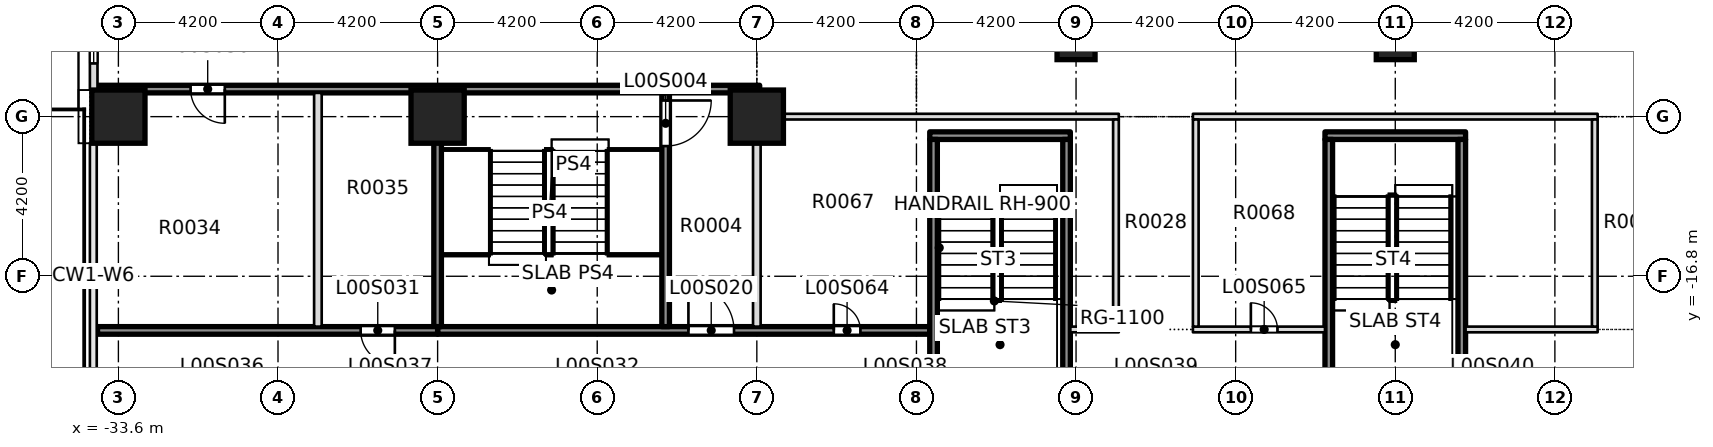
"""IFC4 building model, lengths in metres.
Left out: names, types, materials, properties, quantities, classifications, styles, units other than length and angle.
Written with IfcOpenShell. Run it as: python <this file> out.ifc"""

import sys

from ifc_helpers import new_model, si_unit, direction, frame, frame_2d, origin, origin_2d, place, context, subcontext, project, spatial, rectangle, extrude, element, fill, save


model = new_model("IFC4")
c1 = context("Model", 3, precision=1e-05, world=origin(), true_north=direction((0.0, 1.0)))
c2 = subcontext(c1, "Body", "Model", "MODEL_VIEW")
j1 = project(units=[si_unit("LENGTHUNIT", "METRE"), si_unit("PLANEANGLEUNIT", "RADIAN")], contexts=[c1])
p1 = place(None, origin())
s1 = spatial("IfcSite", under=j1, at=p1, CompositionType="ELEMENT")
p2 = place(p1, origin())
s2 = spatial("IfcBuilding", under=s1, at=p2, CompositionType="ELEMENT")
p3 = place(p2, origin())
s3 = spatial("IfcBuildingStorey", under=s2, at=p3, CompositionType="ELEMENT", Elevation=0.0)
for number, where, z_axis, x_axis in (
    (1, (-25.2, -12.6, -0.45), (0.0, 0.0, 1.0), (1.0, 0.0, 0.0)),
    (2, (-16.8, -12.6, -0.45), (0.0, 0.0, 1.0), (1.0, 0.0, 0.0)),
):
    element("IfcColumn", number, at=place(p3, frame(where, z_axis=z_axis, x_axis=x_axis)), inside=s3, PredefinedType="COLUMN", context=c2, shape_type="SweptSolid", body=[
        extrude(rectangle(XDim=1.4, YDim=1.4, at=origin_2d()), origin(), (0.0, 0.0, 1.0), 7.55),
    ])
for number, where, z_axis, x_axis in (
    (3, (-8.4, -10.6, -0.45), (0.0, 0.0, 1.0), (1.0, 0.0, 0.0)),
    (4, (0.0, -10.6, -0.45), (0.0, 0.0, 1.0), (1.0, 0.0, 0.0)),
):
    element("IfcColumn", number, at=place(p3, frame(where, z_axis=z_axis, x_axis=x_axis)), inside=s3, PredefinedType="COLUMN", context=c2, shape_type="SweptSolid", body=[
        extrude(rectangle(XDim=1.0, YDim=1.0, at=origin_2d()), origin(), (0.0, 0.0, 1.0), 7.55),
    ])
p4 = place(p3, frame((-33.6, -12.6, 0.0), z_axis=(0.0, 0.0, 1.0), x_axis=(1.0, 0.0, 0.0)))
e5 = element("IfcColumn", 5, at=p4, inside=s3, PredefinedType="COLUMN", context=c2, shape_type="SweptSolid", body=[
    extrude(rectangle(XDim=1.4, YDim=1.4, at=origin_2d()), origin(), (0.0, 0.0, 1.0), 7.5),
])
p5 = place(p3, frame((-25.2, -18.225, 0.0), z_axis=(0.0, 0.0, 1.0), x_axis=(1.0, 0.0, 0.0)))
e6 = element("IfcWall", 6, at=p5, inside=s3, PredefinedType="SOLIDWALL", context=c2, shape_type="SweptSolid", body=[
    extrude(rectangle(XDim=12.95, YDim=0.2, at=frame_2d((6.475, 0.0))), origin(), (0.0, 0.0, 1.0), 7.1),
])
p6 = place(p5, frame((6.6, 0.0, 0.0)))
e7 = element("IfcOpeningElement", 7, at=p6, cuts=e6, PredefinedType="OPENING", context=c2, shape_type="SweptSolid", body=[
    extrude(rectangle(XDim=1.2, YDim=2.1, at=frame_2d((0.6, 1.05))), frame((0.0, 0.11, 0.0), z_axis=(0.0, -1.0, 0.0), x_axis=(1.0, 0.0, 0.0)), (0.0, 0.0, 1.0), 0.22),
])
p7 = place(p5, frame((10.425, 0.0, 0.0)))
e8 = element("IfcOpeningElement", 8, at=p7, cuts=e6, PredefinedType="OPENING", context=c2, shape_type="SweptSolid", body=[
    extrude(rectangle(XDim=0.7, YDim=2.1, at=frame_2d((0.35, 1.05))), frame((0.0, 0.11, 0.0), z_axis=(0.0, -1.0, 0.0), x_axis=(1.0, 0.0, 0.0)), (0.0, 0.0, 1.0), 0.22),
])
p8 = place(p3, frame((-8.55, -18.2, 0.0), z_axis=(0.0, 0.0, 1.0), x_axis=(1.0, 0.0, 0.0)))
e9 = element("IfcWall", 9, at=p8, inside=s3, PredefinedType="PARTITIONING", context=c2, shape_type="SweptSolid", body=[
    extrude(rectangle(XDim=1.275, YDim=0.15, at=frame_2d((0.638, 0.0))), origin(), (0.0, 0.0, 1.0), 7.1),
])
p9 = place(p3, frame((-5.325, -18.2, 0.0), z_axis=(0.0, 0.0, 1.0), x_axis=(1.0, 0.0, 0.0)))
e10 = element("IfcWall", 10, at=p9, inside=s3, PredefinedType="PARTITIONING", context=c2, shape_type="SweptSolid", body=[
    extrude(rectangle(XDim=3.475, YDim=0.15, at=frame_2d((1.737, 0.0))), origin(), (0.0, 0.0, 1.0), 7.1),
])
p10 = place(p9, frame((1.525, 0.0, 0.0)))
e11 = element("IfcOpeningElement", 11, at=p10, cuts=e10, PredefinedType="OPENING", context=c2, shape_type="SweptSolid", body=[
    extrude(rectangle(XDim=0.7, YDim=2.1, at=frame_2d((0.35, 1.05))), frame((0.0, 0.085, 0.0), z_axis=(0.0, -1.0, 0.0), x_axis=(1.0, 0.0, 0.0)), (0.0, 0.0, 1.0), 0.17),
])
p11 = place(p3, frame((1.85, -18.2, 0.0), z_axis=(0.0, 0.0, 1.0), x_axis=(1.0, 0.0, 0.0)))
e12 = element("IfcWall", 12, at=p11, inside=s3, PredefinedType="PARTITIONING", context=c2, shape_type="SweptSolid", body=[
    extrude(rectangle(XDim=3.475, YDim=0.15, at=frame_2d((1.737, 0.0))), origin(), (0.0, 0.0, 1.0), 7.1),
])
p12 = place(p3, frame((-16.9, -12.6, 0.0), z_axis=(0.0, 0.0, 1.0), x_axis=(1.0, 0.0, 0.0)))
e13 = element("IfcWall", 13, at=p12, inside=s3, PredefinedType="PARTITIONING", context=c2, shape_type="SweptSolid", body=[
    extrude(rectangle(XDim=9.625, YDim=0.15, at=frame_2d((4.812, 0.0))), origin(), (0.0, 0.0, 1.0), 7.1),
])
p13 = place(p3, frame((-5.325, -12.6, 0.0), z_axis=(0.0, 0.0, 1.0), x_axis=(1.0, 0.0, 0.0)))
e14 = element("IfcWall", 14, at=p13, inside=s3, PredefinedType="PARTITIONING", context=c2, shape_type="SweptSolid", body=[
    extrude(rectangle(XDim=10.65, YDim=0.15, at=frame_2d((5.325, 0.0))), origin(), (0.0, 0.0, 1.0), 7.1),
])
p14 = place(p3, frame((-34.15, -11.875, 0.0), z_axis=(0.0, 0.0, 1.0), x_axis=(1.0, 0.0, 0.0)))
e15 = element("IfcWall", 15, at=p14, inside=s3, PredefinedType="SOLIDWALL", context=c2, shape_type="SweptSolid", body=[
    extrude(rectangle(XDim=17.425, YDim=0.2, at=frame_2d((8.712, 0.0))), origin(), (0.0, 0.0, 1.0), 7.1),
])
p15 = place(p14, frame((2.45, 0.0, 0.0)))
e16 = element("IfcOpeningElement", 16, at=p15, cuts=e15, PredefinedType="OPENING", context=c2, shape_type="SweptSolid", body=[
    extrude(rectangle(XDim=0.9, YDim=2.1, at=frame_2d((0.45, 1.05))), frame((0.0, 0.11, 0.0), z_axis=(0.0, -1.0, 0.0), x_axis=(1.0, 0.0, 0.0)), (0.0, 0.0, 1.0), 0.22),
])
p16 = place(p3, frame((-28.35, -18.125, 0.0), z_axis=(0.0, 0.0, 1.0), x_axis=(0.0, 1.0, 0.0)))
e17 = element("IfcWall", 17, at=p16, inside=s3, PredefinedType="PARTITIONING", context=c2, shape_type="SweptSolid", body=[
    extrude(rectangle(XDim=6.15, YDim=0.2, at=frame_2d((3.075, 0.0))), origin(), (0.0, 0.0, 1.0), 7.1),
])
p17 = place(p3, frame((-25.2, -18.125, 0.0), z_axis=(0.0, 0.0, 1.0), x_axis=(0.0, 1.0, 0.0)))
e18 = element("IfcWall", 18, at=p17, inside=s3, PredefinedType="SOLIDWALL", context=c2, shape_type="SweptSolid", body=[
    extrude(rectangle(XDim=6.15, YDim=0.2, at=frame_2d((3.075, 0.0))), origin(), (0.0, 0.0, 1.0), 7.1),
])
p18 = place(p3, frame((-19.2, -18.125, 0.0), z_axis=(0.0, 0.0, 1.0), x_axis=(0.0, 1.0, 0.0)))
e19 = element("IfcWall", 19, at=p18, inside=s3, PredefinedType="SOLIDWALL", context=c2, shape_type="SweptSolid", body=[
    extrude(rectangle(XDim=6.15, YDim=0.2, at=frame_2d((3.075, 0.0))), origin(), (0.0, 0.0, 1.0), 7.1),
])
p19 = place(p18, frame((4.75, 0.0, 0.0)))
e20 = element("IfcOpeningElement", 20, at=p19, cuts=e19, PredefinedType="OPENING", context=c2, shape_type="SweptSolid", body=[
    extrude(rectangle(XDim=1.2, YDim=2.1, at=frame_2d((0.6, 1.05))), frame((0.0, 0.11, 0.0), z_axis=(0.0, -1.0, 0.0), x_axis=(1.0, 0.0, 0.0)), (0.0, 0.0, 1.0), 0.22),
])
p20 = place(p3, frame((-16.8, -18.125, 0.0), z_axis=(0.0, 0.0, 1.0), x_axis=(0.0, 1.0, 0.0)))
e21 = element("IfcWall", 21, at=p20, inside=s3, PredefinedType="PARTITIONING", context=c2, shape_type="SweptSolid", body=[
    extrude(rectangle(XDim=5.45, YDim=0.2, at=frame_2d((2.725, 0.0))), origin(), (0.0, 0.0, 1.0), 7.1),
])
p21 = place(p3, frame((-16.775, -12.525, 0.0), z_axis=(0.0, 0.0, 1.0), x_axis=(-0.043289881256, 0.999062553688, 0.0)))
e22 = element("IfcWall", 22, at=p21, inside=s3, PredefinedType="SOLIDWALL", context=c2, shape_type="SweptSolid", body=[
    extrude(rectangle(XDim=0.575, YDim=0.2, at=frame_2d((0.288, 0.0))), origin(), (0.0, 0.0, 1.0), 7.1),
])
for number, where, z_axis, x_axis in (
    (23, (-7.35, -18.125, 0.0), (0.0, 0.0, 1.0), (0.0, 1.0, 0.0)),
    (24, (-5.25, -18.125, 0.0), (0.0, 0.0, 1.0), (0.0, 1.0, 0.0)),
    (25, (5.25, -18.125, 0.0), (0.0, 0.0, 1.0), (0.0, 1.0, 0.0)),
):
    element("IfcWall", number, at=place(p3, frame(where, z_axis=z_axis, x_axis=x_axis)), inside=s3, PredefinedType="PARTITIONING", context=c2, shape_type="SweptSolid", body=[
        extrude(rectangle(XDim=5.45, YDim=0.15, at=frame_2d((2.725, 0.0))), origin(), (0.0, 0.0, 1.0), 7.1),
    ])
p22 = place(p3, frame((-34.25, -11.9, 0.0), z_axis=(0.0, 0.0, 1.0), x_axis=(0.0, 1.0, 0.0)))
e26 = element("IfcWall", 26, at=p22, inside=s3, PredefinedType="STANDARD", context=c2, shape_type="SweptSolid", body=[
    extrude(rectangle(XDim=7.0, YDim=0.2, at=frame_2d((3.5, 0.0))), origin(), (0.0, 0.0, 1.0), 7.1),
])
p23 = place(p22, frame((4.5, 0.0, 0.3)))
e27 = element("IfcOpeningElement", 27, at=p23, cuts=e26, PredefinedType="OPENING", context=c2, shape_type="SweptSolid", body=[
    extrude(rectangle(XDim=1.8, YDim=4.2, at=frame_2d((0.9, 2.1))), frame((0.0, 0.11, 0.0), z_axis=(0.0, -1.0, 0.0), x_axis=(1.0, 0.0, 0.0)), (0.0, 0.0, 1.0), 0.22),
])
p24 = place(p22, frame((2.6, 0.0, 0.0)))
e28 = element("IfcOpeningElement", 28, at=p24, cuts=e26, PredefinedType="OPENING", context=c2, shape_type="SweptSolid", body=[
    extrude(rectangle(XDim=1.8, YDim=2.4, at=frame_2d((0.9, 1.2))), frame((0.0, 0.11, 0.0), z_axis=(0.0, -1.0, 0.0), x_axis=(1.0, 0.0, 0.0)), (0.0, 0.0, 1.0), 0.22),
])
p25 = place(p22, frame((0.7, 0.0, 0.3)))
e29 = element("IfcOpeningElement", 29, at=p25, cuts=e26, PredefinedType="OPENING", context=c2, shape_type="SweptSolid", body=[
    extrude(rectangle(XDim=1.8, YDim=4.2, at=frame_2d((0.9, 2.1))), frame((0.0, 0.11, 0.0), z_axis=(0.0, -1.0, 0.0), x_axis=(1.0, 0.0, 0.0)), (0.0, 0.0, 1.0), 0.22),
])
p26 = place(p3, frame((-12.25, -13.1, 0.0), z_axis=(0.0, 0.0, 1.0), x_axis=(1.0, 0.0, 0.0)))
e30 = element("IfcWall", 30, at=p26, inside=s3, PredefinedType="SOLIDWALL", context=c2, shape_type="SweptSolid", body=[
    extrude(rectangle(XDim=3.7, YDim=0.2, at=frame_2d((1.85, 0.0))), origin(), (0.0, 0.0, 1.0), 7.1),
])
p27 = place(p3, frame((-12.15, -19.8, 0.0), z_axis=(0.0, 0.0, 1.0), x_axis=(0.0, 1.0, 0.0)))
e31 = element("IfcWall", 31, at=p27, inside=s3, PredefinedType="SOLIDWALL", context=c2, shape_type="SweptSolid", body=[
    extrude(rectangle(XDim=6.6, YDim=0.2, at=frame_2d((3.3, 0.0))), origin(), (0.0, 0.0, 1.0), 7.1),
])
p28 = place(p3, frame((-8.65, -20.3, 0.0), z_axis=(0.0, 0.0, 1.0), x_axis=(0.0, 1.0, 0.0)))
e32 = element("IfcWall", 32, at=p28, inside=s3, PredefinedType="SOLIDWALL", context=c2, shape_type="SweptSolid", body=[
    extrude(rectangle(XDim=7.1, YDim=0.2, at=frame_2d((3.55, 0.0))), origin(), (0.0, 0.0, 1.0), 7.1),
])
p29 = place(p3, frame((-1.85, -13.1, 0.0), z_axis=(0.0, 0.0, 1.0), x_axis=(1.0, 0.0, 0.0)))
e33 = element("IfcWall", 33, at=p29, inside=s3, PredefinedType="SOLIDWALL", context=c2, shape_type="SweptSolid", body=[
    extrude(rectangle(XDim=3.7, YDim=0.2, at=frame_2d((1.85, 0.0))), origin(), (0.0, 0.0, 1.0), 7.1),
])
for number, where, z_axis, x_axis in (
    (34, (-1.75, -19.8, 0.0), (0.0, 0.0, 1.0), (0.0, 1.0, 0.0)),
    (35, (1.75, -19.8, 0.0), (0.0, 0.0, 1.0), (0.0, 1.0, 0.0)),
):
    element("IfcWall", number, at=place(p3, frame(where, z_axis=z_axis, x_axis=x_axis)), inside=s3, PredefinedType="SOLIDWALL", context=c2, shape_type="SweptSolid", body=[
        extrude(rectangle(XDim=6.6, YDim=0.2, at=frame_2d((3.3, 0.0))), origin(), (0.0, 0.0, 1.0), 7.1),
    ])
p30 = place(p3, frame((-34.15, -18.225, 0.0), z_axis=(0.0, 0.0, 1.0), x_axis=(1.0, 0.0, 0.0)))
e36 = element("IfcWall", 36, at=p30, inside=s3, PredefinedType="SOLIDWALL", context=c2, shape_type="SweptSolid", body=[
    extrude(rectangle(XDim=8.95, YDim=0.2, at=frame_2d((4.475, 0.0))), origin(), (0.0, 0.0, 1.0), 7.1),
])
p31 = place(p30, frame((6.925, 0.0, 0.0)))
e37 = element("IfcOpeningElement", 37, at=p31, cuts=e36, PredefinedType="OPENING", context=c2, shape_type="SweptSolid", body=[
    extrude(rectangle(XDim=0.9, YDim=2.1, at=frame_2d((0.45, 1.05))), frame((0.0, 0.11, 0.0), z_axis=(0.0, -1.0, 0.0), x_axis=(1.0, 0.0, 0.0)), (0.0, 0.0, 1.0), 0.22),
])
p32 = place(p19, origin())
e38 = element("IfcDoor", 38, at=p32, inside=s3, OperationType="DOUBLE_DOOR_SINGLE_SWING", PredefinedType="DOOR", context=c2, shape_type="SweptSolid", body=[
    extrude(rectangle(XDim=1.2, YDim=2.1, at=frame_2d((0.6, 1.05))), frame((0.0, 0.025, 0.0), z_axis=(0.0, -1.0, 0.0), x_axis=(1.0, 0.0, 0.0)), (0.0, 0.0, 1.0), 0.05),
])
fill(e20, e38)
p33 = place(p6, origin())
e39 = element("IfcDoor", 39, at=p33, inside=s3, OperationType="SINGLE_SWING_LEFT", PredefinedType="DOOR", context=c2, shape_type="SweptSolid", body=[
    extrude(rectangle(XDim=1.2, YDim=2.1, at=frame_2d((0.6, 1.05))), frame((0.0, 0.025, 0.0), z_axis=(0.0, -1.0, 0.0), x_axis=(1.0, 0.0, 0.0)), (0.0, 0.0, 1.0), 0.05),
])
fill(e7, e39)
p34 = place(p15, origin())
e40 = element("IfcDoor", 40, at=p34, inside=s3, OperationType="SINGLE_SWING_LEFT", PredefinedType="DOOR", context=c2, shape_type="SweptSolid", body=[
    extrude(rectangle(XDim=0.9, YDim=2.1, at=frame_2d((0.45, 1.05))), frame((0.0, 0.025, 0.0), z_axis=(0.0, -1.0, 0.0), x_axis=(1.0, 0.0, 0.0)), (0.0, 0.0, 1.0), 0.05),
])
fill(e16, e40)
p35 = place(p31, origin())
e41 = element("IfcDoor", 41, at=p35, inside=s3, OperationType="SINGLE_SWING_LEFT", PredefinedType="DOOR", context=c2, shape_type="SweptSolid", body=[
    extrude(rectangle(XDim=0.9, YDim=2.1, at=frame_2d((0.45, 1.05))), frame((0.0, 0.025, 0.0), z_axis=(0.0, -1.0, 0.0), x_axis=(1.0, 0.0, 0.0)), (0.0, 0.0, 1.0), 0.05),
])
fill(e37, e41)
p36 = place(p7, origin())
e42 = element("IfcDoor", 42, at=p36, inside=s3, OperationType="SINGLE_SWING_RIGHT", PredefinedType="DOOR", context=c2, shape_type="SweptSolid", body=[
    extrude(rectangle(XDim=0.7, YDim=2.1, at=frame_2d((0.35, 1.05))), frame((0.0, 0.025, 0.0), z_axis=(0.0, -1.0, 0.0), x_axis=(1.0, 0.0, 0.0)), (0.0, 0.0, 1.0), 0.05),
])
fill(e8, e42)
p37 = place(p10, origin())
e43 = element("IfcDoor", 43, at=p37, inside=s3, OperationType="SINGLE_SWING_LEFT", PredefinedType="DOOR", context=c2, shape_type="SweptSolid", body=[
    extrude(rectangle(XDim=0.7, YDim=2.1, at=frame_2d((0.35, 1.05))), frame((0.0, 0.025, 0.0), z_axis=(0.0, -1.0, 0.0), x_axis=(1.0, 0.0, 0.0)), (0.0, 0.0, 1.0), 0.05),
])
fill(e11, e43)
p38 = place(p25, origin())
e44 = element("IfcWindow", 44, at=p38, inside=s3, PartitioningType="SINGLE_PANEL", PredefinedType="WINDOW", context=c2, shape_type="SweptSolid", body=[
    extrude(rectangle(XDim=1.8, YDim=4.2, at=frame_2d((0.9, 2.1))), frame((0.0, 0.03, 0.0), z_axis=(0.0, -1.0, 0.0), x_axis=(1.0, 0.0, 0.0)), (0.0, 0.0, 1.0), 0.06),
])
fill(e29, e44)
save(model, sys.argv[1])
